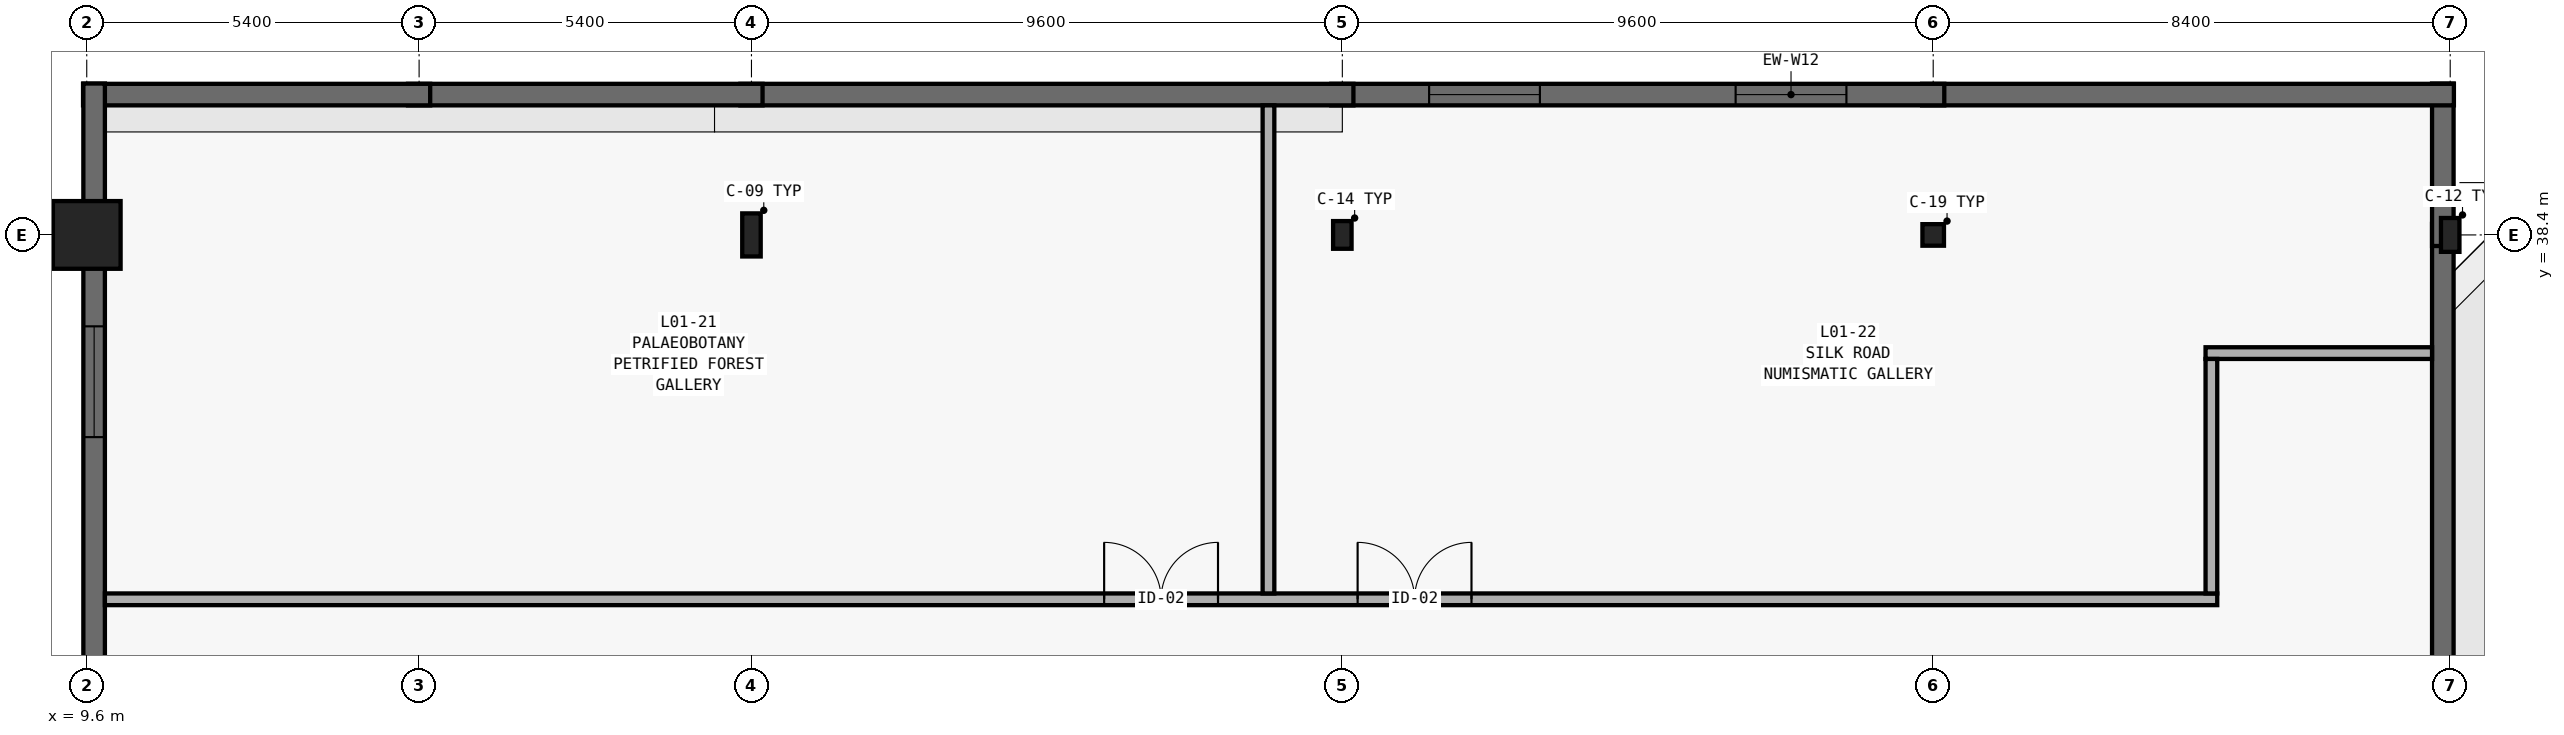
"""IFC4 building model, lengths in metres.
Left out: names, types, materials, properties, quantities, classifications, styles, units other than length and angle.
Written with IfcOpenShell. Run it as: python <this file> out.ifc"""

import sys

from ifc_helpers import new_model, si_unit, direction, frame, frame_2d, origin, origin_2d, place, context, subcontext, project, spatial, rectangle, hollow_rectangle, i_section, extrude, element, fill, save


model = new_model("IFC4")
c1 = context("Model", 3, precision=1e-05, world=origin(), true_north=direction((0.0, 1.0)))
c2 = subcontext(c1, "Body", "Model", "MODEL_VIEW")
j1 = project(units=[si_unit("LENGTHUNIT", "METRE"), si_unit("PLANEANGLEUNIT", "RADIAN")], contexts=[c1])
p1 = place(None, origin())
s1 = spatial("IfcSite", under=j1, at=p1, CompositionType="ELEMENT")
p2 = place(p1, origin())
s2 = spatial("IfcBuilding", under=s1, at=p2, CompositionType="ELEMENT")
p3 = place(p2, frame((0.0, 0.0, 4.8)))
s3 = spatial("IfcBuildingStorey", under=s2, at=p3, CompositionType="ELEMENT", Elevation=4.8)
p4 = place(p3, frame((9.6, 38.4, 0.0), z_axis=(0.0, 0.0, 1.0), x_axis=(1.0, 0.0, 0.0)))
e1 = element("IfcColumn", 1, at=p4, inside=s3, PredefinedType="COLUMN", context=c2, shape_type="SweptSolid", body=[
    extrude(rectangle(XDim=1.1, YDim=1.1, at=origin_2d()), origin(), (0.0, 0.0, 1.0), 4.2),
])
p5 = place(p3, frame((20.4, 38.4, 0.0), z_axis=(0.0, 0.0, 1.0), x_axis=(1.0, 0.0, 0.0)))
e2 = element("IfcColumn", 2, at=p5, inside=s3, PredefinedType="COLUMN", context=c2, shape_type="SweptSolid", body=[
    extrude(i_section(OverallWidth=0.3, OverallDepth=0.7, WebThickness=0.017, FlangeThickness=0.032, FilletRadius=0.027, at=origin_2d()), origin(), (0.0, 0.0, 1.0), 4.2),
])
p6 = place(p3, frame((30.0, 38.4, 0.0), z_axis=(0.0, 0.0, 1.0), x_axis=(1.0, 0.0, 0.0)))
e3 = element("IfcColumn", 3, at=p6, inside=s3, PredefinedType="COLUMN", context=c2, shape_type="SweptSolid", body=[
    extrude(i_section(OverallWidth=0.3, OverallDepth=0.45, WebThickness=0.014, FlangeThickness=0.026, FilletRadius=0.027, at=origin_2d()), origin(), (0.0, 0.0, 1.0), 4.2),
])
p7 = place(p3, frame((39.6, 38.4, 0.0), z_axis=(0.0, 0.0, 1.0), x_axis=(1.0, 0.0, 0.0)))
e4 = element("IfcColumn", 4, at=p7, inside=s3, PredefinedType="COLUMN", context=c2, shape_type="SweptSolid", body=[
    extrude(hollow_rectangle(XDim=0.35, YDim=0.35, WallThickness=0.016, at=origin_2d()), origin(), (0.0, 0.0, 1.0), 4.2),
])
p8 = place(p3, frame((48.0, 38.4, 0.0), z_axis=(0.0, 0.0, 1.0), x_axis=(1.0, 0.0, 0.0)))
e5 = element("IfcColumn", 5, at=p8, inside=s3, PredefinedType="COLUMN", context=c2, shape_type="SweptSolid", body=[
    extrude(i_section(OverallWidth=0.3, OverallDepth=0.55, WebThickness=0.015, FlangeThickness=0.029, FilletRadius=0.027, at=origin_2d()), origin(), (0.0, 0.0, 1.0), 4.2),
])
p9 = place(p3, frame((47.88, 29.82, 0.0), z_axis=(0.0, 0.0, 1.0), x_axis=(0.0, 1.0, 0.0)))
e6 = element("IfcWall", 6, at=p9, inside=s3, PredefinedType="STANDARD", context=c2, shape_type="SweptSolid", body=[
    extrude(rectangle(XDim=8.76, YDim=0.35, at=frame_2d((4.38, 0.0))), origin(), (0.0, 0.0, 1.0), 3.9),
])
p10 = place(p3, frame((47.88, 38.22, 0.0), z_axis=(0.0, 0.0, 1.0), x_axis=(0.0, 1.0, 0.0)))
e7 = element("IfcWall", 7, at=p10, inside=s3, PredefinedType="STANDARD", context=c2, shape_type="SweptSolid", body=[
    extrude(rectangle(XDim=2.64, YDim=0.35, at=frame_2d((1.32, 0.0))), origin(), (0.0, 0.0, 1.0), 3.9),
])
p11 = place(p3, frame((48.06, 40.68, 0.0), z_axis=(0.0, 0.0, 1.0), x_axis=(-1.0, 0.0, 0.0)))
e8 = element("IfcWall", 8, at=p11, inside=s3, PredefinedType="STANDARD", context=c2, shape_type="SweptSolid", body=[
    extrude(rectangle(XDim=8.64, YDim=0.35, at=frame_2d((4.32, 0.0))), origin(), (0.0, 0.0, 1.0), 3.9),
])
p12 = place(p3, frame((39.78, 40.68, 0.0), z_axis=(0.0, 0.0, 1.0), x_axis=(-1.0, 0.0, 0.0)))
e9 = element("IfcWall", 9, at=p12, inside=s3, PredefinedType="STANDARD", context=c2, shape_type="SweptSolid", body=[
    extrude(rectangle(XDim=9.96, YDim=0.35, at=frame_2d((4.98, 0.0))), origin(), (0.0, 0.0, 1.0), 3.9),
])
p13 = place(p12, frame((1.59, 0.0, 0.9)))
e10 = element("IfcOpeningElement", 10, at=p13, cuts=e9, PredefinedType="OPENING", context=c2, shape_type="SweptSolid", body=[
    extrude(rectangle(XDim=1.8, YDim=1.1, at=frame_2d((0.9, 0.55))), frame((0.0, 0.19, 0.0), z_axis=(0.0, -1.0, 0.0), x_axis=(1.0, 0.0, 0.0)), (0.0, 0.0, 1.0), 0.38),
])
p14 = place(p12, frame((6.57, 0.0, 0.9)))
e11 = element("IfcOpeningElement", 11, at=p14, cuts=e9, PredefinedType="OPENING", context=c2, shape_type="SweptSolid", body=[
    extrude(rectangle(XDim=1.8, YDim=1.1, at=frame_2d((0.9, 0.55))), frame((0.0, 0.19, 0.0), z_axis=(0.0, -1.0, 0.0), x_axis=(1.0, 0.0, 0.0)), (0.0, 0.0, 1.0), 0.38),
])
p15 = place(p3, frame((30.18, 40.68, 0.0), z_axis=(0.0, 0.0, 1.0), x_axis=(-1.0, 0.0, 0.0)))
e12 = element("IfcWall", 12, at=p15, inside=s3, PredefinedType="STANDARD", context=c2, shape_type="SweptSolid", body=[
    extrude(rectangle(XDim=9.96, YDim=0.35, at=frame_2d((4.98, 0.0))), origin(), (0.0, 0.0, 1.0), 3.9),
])
p16 = place(p3, frame((20.58, 40.68, 0.0), z_axis=(0.0, 0.0, 1.0), x_axis=(-1.0, 0.0, 0.0)))
e13 = element("IfcWall", 13, at=p16, inside=s3, PredefinedType="STANDARD", context=c2, shape_type="SweptSolid", body=[
    extrude(rectangle(XDim=5.76, YDim=0.35, at=frame_2d((2.88, 0.0))), origin(), (0.0, 0.0, 1.0), 3.9),
])
p17 = place(p3, frame((15.18, 40.68, 0.0), z_axis=(0.0, 0.0, 1.0), x_axis=(-1.0, 0.0, 0.0)))
e14 = element("IfcWall", 14, at=p17, inside=s3, PredefinedType="STANDARD", context=c2, shape_type="SweptSolid", body=[
    extrude(rectangle(XDim=5.64, YDim=0.35, at=frame_2d((2.82, 0.0))), origin(), (0.0, 0.0, 1.0), 3.9),
])
p18 = place(p3, frame((9.72, 40.86, 0.0), z_axis=(0.0, 0.0, 1.0), x_axis=(0.0, -1.0, 0.0)))
e15 = element("IfcWall", 15, at=p18, inside=s3, PredefinedType="STANDARD", context=c2, shape_type="SweptSolid", body=[
    extrude(rectangle(XDim=2.64, YDim=0.35, at=frame_2d((1.32, 0.0))), origin(), (0.0, 0.0, 1.0), 3.9),
])
p19 = place(p3, frame((9.72, 38.58, 0.0), z_axis=(0.0, 0.0, 1.0), x_axis=(0.0, -1.0, 0.0)))
e16 = element("IfcWall", 16, at=p19, inside=s3, PredefinedType="STANDARD", context=c2, shape_type="SweptSolid", body=[
    extrude(rectangle(XDim=8.76, YDim=0.35, at=frame_2d((4.38, 0.0))), origin(), (0.0, 0.0, 1.0), 3.9),
])
p20 = place(p19, frame((1.665, 0.0, 0.9)))
e17 = element("IfcOpeningElement", 17, at=p20, cuts=e16, PredefinedType="OPENING", context=c2, shape_type="SweptSolid", body=[
    extrude(rectangle(XDim=1.8, YDim=1.1, at=frame_2d((0.9, 0.55))), frame((0.0, 0.19, 0.0), z_axis=(0.0, -1.0, 0.0), x_axis=(1.0, 0.0, 0.0)), (0.0, 0.0, 1.0), 0.38),
])
p21 = place(p3, frame((9.895, 32.48, 0.0), z_axis=(0.0, 0.0, 1.0), x_axis=(1.0, 0.0, 0.0)))
e18 = element("IfcWall", 18, at=p21, inside=s3, PredefinedType="PARTITIONING", context=c2, shape_type="SweptSolid", body=[
    extrude(rectangle(XDim=34.32, YDim=0.19, at=frame_2d((17.16, 0.0))), origin(), (0.0, 0.0, 1.0), 2.76),
])
p22 = place(p21, frame((16.235, 0.0, 0.0)))
e19 = element("IfcOpeningElement", 19, at=p22, cuts=e18, PredefinedType="OPENING", context=c2, shape_type="SweptSolid", body=[
    extrude(rectangle(XDim=1.85, YDim=2.35, at=frame_2d((0.925, 1.175))), frame((0.0, 0.11, 0.0), z_axis=(0.0, -1.0, 0.0), x_axis=(1.0, 0.0, 0.0)), (0.0, 0.0, 1.0), 0.22),
])
p23 = place(p21, frame((20.354, 0.0, 0.0)))
e20 = element("IfcOpeningElement", 20, at=p23, cuts=e18, PredefinedType="OPENING", context=c2, shape_type="SweptSolid", body=[
    extrude(rectangle(XDim=1.85, YDim=2.35, at=frame_2d((0.925, 1.175))), frame((0.0, 0.11, 0.0), z_axis=(0.0, -1.0, 0.0), x_axis=(1.0, 0.0, 0.0)), (0.0, 0.0, 1.0), 0.22),
])
p24 = place(p3, frame((44.025, 36.48, 0.0), z_axis=(0.0, 0.0, 1.0), x_axis=(1.0, 0.0, 0.0)))
e21 = element("IfcWall", 21, at=p24, inside=s3, PredefinedType="PARTITIONING", context=c2, shape_type="SweptSolid", body=[
    extrude(rectangle(XDim=3.68, YDim=0.19, at=frame_2d((1.84, 0.0))), origin(), (0.0, 0.0, 1.0), 2.76),
])
p25 = place(p3, frame((28.8, 32.575, 0.0), z_axis=(0.0, 0.0, 1.0), x_axis=(0.0, 1.0, 0.0)))
e22 = element("IfcWall", 22, at=p25, inside=s3, PredefinedType="PARTITIONING", context=c2, shape_type="SweptSolid", body=[
    extrude(rectangle(XDim=7.93, YDim=0.19, at=frame_2d((3.965, 0.0))), origin(), (0.0, 0.0, 1.0), 2.76),
])
p26 = place(p3, frame((44.12, 32.575, 0.0), z_axis=(0.0, 0.0, 1.0), x_axis=(0.0, 1.0, 0.0)))
e23 = element("IfcWall", 23, at=p26, inside=s3, PredefinedType="PARTITIONING", context=c2, shape_type="SweptSolid", body=[
    extrude(rectangle(XDim=3.81, YDim=0.19, at=frame_2d((1.905, 0.0))), origin(), (0.0, 0.0, 1.0), 2.76),
])
p27 = place(p13, origin())
e24 = element("IfcWindow", 24, at=p27, inside=s3, PartitioningType="SINGLE_PANEL", PredefinedType="WINDOW", context=c2, shape_type="SweptSolid", body=[
    extrude(rectangle(XDim=1.8, YDim=1.1, at=frame_2d((0.9, 0.55))), frame((0.0, 0.03, 0.0), z_axis=(0.0, -1.0, 0.0), x_axis=(1.0, 0.0, 0.0)), (0.0, 0.0, 1.0), 0.06),
])
fill(e10, e24)
p28 = place(p14, origin())
e25 = element("IfcWindow", 25, at=p28, inside=s3, PartitioningType="SINGLE_PANEL", PredefinedType="WINDOW", context=c2, shape_type="SweptSolid", body=[
    extrude(rectangle(XDim=1.8, YDim=1.1, at=frame_2d((0.9, 0.55))), frame((0.0, 0.03, 0.0), z_axis=(0.0, -1.0, 0.0), x_axis=(1.0, 0.0, 0.0)), (0.0, 0.0, 1.0), 0.06),
])
fill(e11, e25)
p29 = place(p20, origin())
e26 = element("IfcWindow", 26, at=p29, inside=s3, PartitioningType="SINGLE_PANEL", PredefinedType="WINDOW", context=c2, shape_type="SweptSolid", body=[
    extrude(rectangle(XDim=1.8, YDim=1.1, at=frame_2d((0.9, 0.55))), frame((0.0, 0.03, 0.0), z_axis=(0.0, -1.0, 0.0), x_axis=(1.0, 0.0, 0.0)), (0.0, 0.0, 1.0), 0.06),
])
fill(e17, e26)
p30 = place(p22, origin())
e27 = element("IfcDoor", 27, at=p30, inside=s3, OperationType="DOUBLE_DOOR_SINGLE_SWING", PredefinedType="DOOR", context=c2, shape_type="SweptSolid", body=[
    extrude(rectangle(XDim=1.85, YDim=2.35, at=frame_2d((0.925, 1.175))), frame((0.0, 0.025, 0.0), z_axis=(0.0, -1.0, 0.0), x_axis=(1.0, 0.0, 0.0)), (0.0, 0.0, 1.0), 0.05),
])
fill(e19, e27)
p31 = place(p23, origin())
e28 = element("IfcDoor", 28, at=p31, inside=s3, OperationType="DOUBLE_DOOR_SINGLE_SWING", PredefinedType="DOOR", context=c2, shape_type="SweptSolid", body=[
    extrude(rectangle(XDim=1.85, YDim=2.35, at=frame_2d((0.925, 1.175))), frame((0.0, 0.025, 0.0), z_axis=(0.0, -1.0, 0.0), x_axis=(1.0, 0.0, 0.0)), (0.0, 0.0, 1.0), 0.05),
])
fill(e20, e28)
save(model, sys.argv[1])
